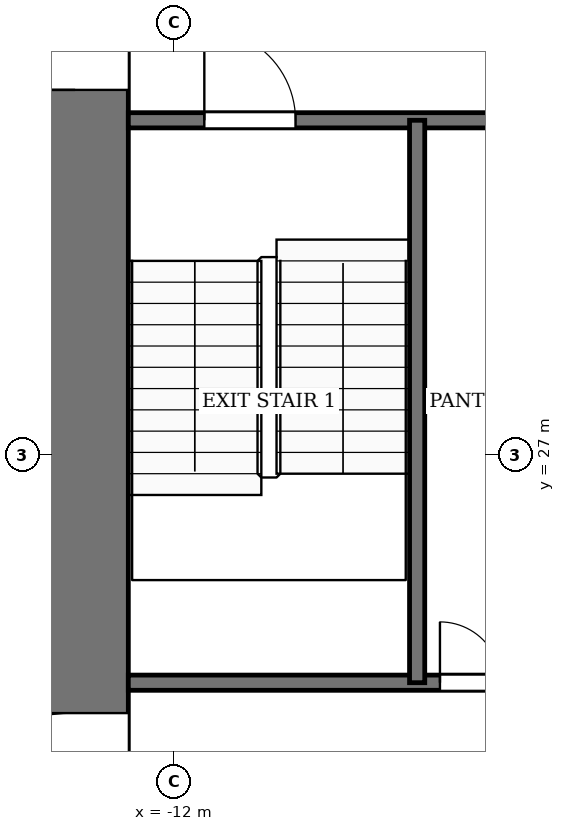
"""IFC4 building model, lengths in metres.
Left out: names, types, materials, properties, quantities, classifications, styles, units other than length and angle.
Written with IfcOpenShell. Run it as: python <this file> out.ifc"""

import sys

from ifc_helpers import new_model, si_unit, direction, frame, frame_2d, origin, place, context, subcontext, project, spatial, rectangle, extrude, element, fill, save


model = new_model("IFC4")
c1 = context("Model", 3, precision=1e-05, world=origin(), true_north=direction((0.0, 1.0)))
c2 = subcontext(c1, "Body", "Model", "MODEL_VIEW")
j1 = project(units=[si_unit("LENGTHUNIT", "METRE"), si_unit("PLANEANGLEUNIT", "RADIAN")], contexts=[c1])
p1 = place(None, origin())
s1 = spatial("IfcSite", under=j1, at=p1, CompositionType="ELEMENT")
p2 = place(p1, origin())
s2 = spatial("IfcBuilding", under=s1, at=p2, CompositionType="ELEMENT")
p3 = place(p2, frame((0.0, 0.0, 26.0)))
s3 = spatial("IfcBuildingStorey", under=s2, at=p3, CompositionType="ELEMENT", Elevation=26.0)
p4 = place(p3, frame((-13.3, 18.4, -0.13), z_axis=(0.0, 0.0, 1.0), x_axis=(0.0, 1.0, 0.0)))
e1 = element("IfcWall", 1, at=p4, inside=s3, PredefinedType="SHEAR", context=c2, shape_type="SweptSolid", body=[
    extrude(rectangle(XDim=19.2, YDim=1.4, at=frame_2d((9.6, 0.0))), origin(), (0.0, 0.0, 1.0), 4.0),
])
p5 = place(p4, frame((2.8, 0.0, 0.13)))
e2 = element("IfcOpeningElement", 2, at=p5, cuts=e1, PredefinedType="OPENING", context=c2, shape_type="SweptSolid", body=[
    extrude(rectangle(XDim=2.4, YDim=2.4, at=frame_2d((1.2, 1.2))), frame((0.0, 0.71, 0.0), z_axis=(0.0, -1.0, 0.0), x_axis=(1.0, 0.0, 0.0)), (0.0, 0.0, 1.0), 1.42),
])
p6 = place(p4, frame((13.4, 0.0, 0.13)))
e3 = element("IfcOpeningElement", 3, at=p6, cuts=e1, PredefinedType="OPENING", context=c2, shape_type="SweptSolid", body=[
    extrude(rectangle(XDim=1.4, YDim=2.2, at=frame_2d((0.7, 1.1))), frame((0.0, 0.71, 0.0), z_axis=(0.0, -1.0, 0.0), x_axis=(1.0, 0.0, 0.0)), (0.0, 0.0, 1.0), 1.42),
])
p7 = place(p3, frame((-12.6, 24.0, 0.0), z_axis=(0.0, 0.0, 1.0), x_axis=(1.0, 0.0, 0.0)))
e4 = element("IfcWall", 4, at=p7, inside=s3, PredefinedType="PARTITIONING", context=c2, shape_type="SweptSolid", body=[
    extrude(rectangle(XDim=6.6, YDim=0.2, at=frame_2d((3.3, 0.0))), origin(), (0.0, 0.0, 1.0), 3.87),
])
p8 = place(p7, frame((4.1, 0.0, 0.0)))
e5 = element("IfcOpeningElement", 5, at=p8, cuts=e4, PredefinedType="OPENING", context=c2, shape_type="SweptSolid", body=[
    extrude(rectangle(XDim=0.8, YDim=2.1, at=frame_2d((0.4, 1.05))), frame((0.0, 0.11, 0.0), z_axis=(0.0, -1.0, 0.0), x_axis=(1.0, 0.0, 0.0)), (0.0, 0.0, 1.0), 0.22),
])
p9 = place(p7, frame((5.5, 0.0, 0.0)))
e6 = element("IfcOpeningElement", 6, at=p9, cuts=e4, PredefinedType="OPENING", context=c2, shape_type="SweptSolid", body=[
    extrude(rectangle(XDim=0.8, YDim=2.1, at=frame_2d((0.4, 1.05))), frame((0.0, 0.11, 0.0), z_axis=(0.0, -1.0, 0.0), x_axis=(1.0, 0.0, 0.0)), (0.0, 0.0, 1.0), 0.22),
])
p10 = place(p3, frame((-12.6, 31.4, 0.0), z_axis=(0.0, 0.0, 1.0), x_axis=(1.0, 0.0, 0.0)))
e7 = element("IfcWall", 7, at=p10, inside=s3, PredefinedType="PARTITIONING", context=c2, shape_type="SweptSolid", body=[
    extrude(rectangle(XDim=6.6, YDim=0.2, at=frame_2d((3.3, 0.0))), origin(), (0.0, 0.0, 1.0), 3.87),
])
p11 = place(p10, frame((1.0, 0.0, 0.0)))
e8 = element("IfcOpeningElement", 8, at=p11, cuts=e7, PredefinedType="OPENING", context=c2, shape_type="SweptSolid", body=[
    extrude(rectangle(XDim=1.2, YDim=2.2, at=frame_2d((0.6, 1.1))), frame((0.0, 0.11, 0.0), z_axis=(0.0, -1.0, 0.0), x_axis=(1.0, 0.0, 0.0)), (0.0, 0.0, 1.0), 0.22),
])
p12 = place(p3, frame((-8.8, 24.0, 0.0), z_axis=(0.0, 0.0, 1.0), x_axis=(0.0, 1.0, 0.0)))
e9 = element("IfcWall", 9, at=p12, inside=s3, PredefinedType="PARTITIONING", context=c2, shape_type="SweptSolid", body=[
    extrude(rectangle(XDim=7.4, YDim=0.2, at=frame_2d((3.7, 0.0))), origin(), (0.0, 0.0, 1.0), 3.87),
])
p13 = place(p8, origin())
e10 = element("IfcDoor", 10, at=p13, inside=s3, OperationType="SINGLE_SWING_LEFT", PredefinedType="DOOR", context=c2, shape_type="SweptSolid", body=[
    extrude(rectangle(XDim=0.8, YDim=2.1, at=frame_2d((0.4, 1.05))), frame((0.0, 0.025, 0.0), z_axis=(0.0, -1.0, 0.0), x_axis=(1.0, 0.0, 0.0)), (0.0, 0.0, 1.0), 0.05),
])
fill(e5, e10)
p14 = place(p11, origin())
e11 = element("IfcDoor", 11, at=p14, inside=s3, OperationType="SINGLE_SWING_RIGHT", PredefinedType="DOOR", context=c2, shape_type="SweptSolid", body=[
    extrude(rectangle(XDim=1.2, YDim=2.2, at=frame_2d((0.6, 1.1))), frame((0.0, 0.025, 0.0), z_axis=(0.0, -1.0, 0.0), x_axis=(1.0, 0.0, 0.0)), (0.0, 0.0, 1.0), 0.05),
])
fill(e8, e11)
p15 = place(p5, origin())
e12 = element("IfcDoor", 12, at=p15, inside=s3, OperationType="DOUBLE_DOOR_SINGLE_SWING", PredefinedType="DOOR", context=c2, shape_type="SweptSolid", body=[
    extrude(rectangle(XDim=2.4, YDim=2.4, at=frame_2d((1.2, 1.2))), frame((0.0, 0.025, 0.0), z_axis=(0.0, -1.0, 0.0), x_axis=(1.0, 0.0, 0.0)), (0.0, 0.0, 1.0), 0.05),
])
fill(e2, e12)
p16 = place(p6, origin())
e13 = element("IfcDoor", 13, at=p16, inside=s3, OperationType="SINGLE_SWING_RIGHT", PredefinedType="DOOR", context=c2, shape_type="SweptSolid", body=[
    extrude(rectangle(XDim=1.4, YDim=2.2, at=frame_2d((0.7, 1.1))), frame((0.0, 0.025, 0.0), z_axis=(0.0, -1.0, 0.0), x_axis=(1.0, 0.0, 0.0)), (0.0, 0.0, 1.0), 0.05),
])
fill(e3, e13)
save(model, sys.argv[1])
